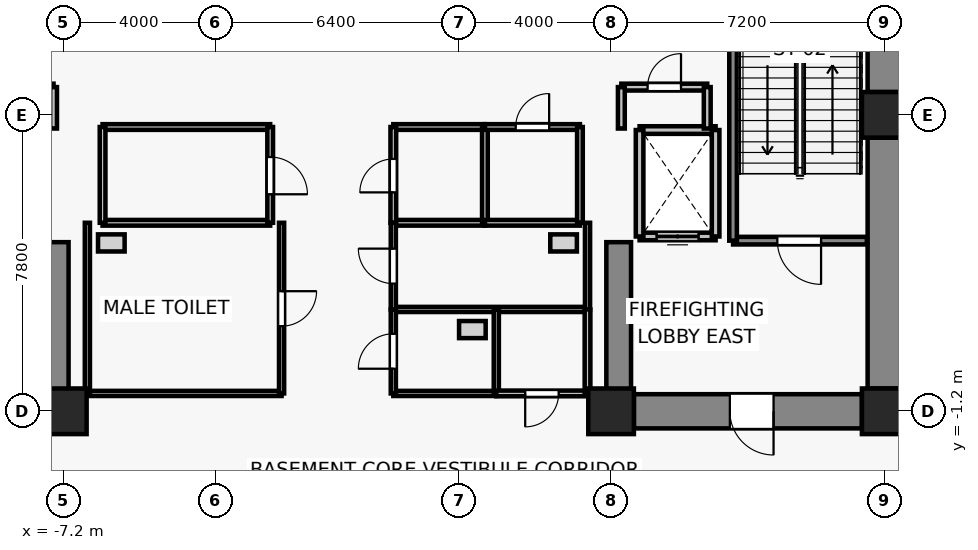
"""IFC4 building model, lengths in metres.
Left out: names, types, materials, properties, quantities, classifications, styles, units other than length and angle.
Written with IfcOpenShell. Run it as: python <this file> out.ifc"""

import sys

from ifc_helpers import new_model, si_unit, direction, frame, frame_2d, origin, origin_2d, place, context, subcontext, project, spatial, rectangle, extrude, source, transform, mapped, element, fill, save


model = new_model("IFC4")
c1 = context("Model", 3, precision=1e-05, world=origin(), true_north=direction((0.0, 1.0)))
c2 = subcontext(c1, "Body", "Model", "MODEL_VIEW")
j1 = project(units=[si_unit("LENGTHUNIT", "METRE"), si_unit("PLANEANGLEUNIT", "RADIAN")], contexts=[c1])
p1 = place(None, origin())
s1 = spatial("IfcSite", under=j1, at=p1, CompositionType="ELEMENT")
p2 = place(p1, origin())
s2 = spatial("IfcBuilding", under=s1, at=p2, CompositionType="ELEMENT")
p3 = place(p2, frame((0.0, 0.0, -4.4)))
s3 = spatial("IfcBuildingStorey", under=s2, at=p3, CompositionType="ELEMENT", Elevation=-4.4)
for number, where, z_axis, x_axis in (
    (1, (-7.2, -1.2, 0.0), (0.0, 0.0, 1.0), (1.0, 0.0, 0.0)),
    (2, (7.2, -1.2, 0.0), (0.0, 0.0, 1.0), (1.0, 0.0, 0.0)),
    (3, (14.4, -1.2, 0.0), (0.0, 0.0, 1.0), (1.0, 0.0, 0.0)),
    (4, (14.4, 6.6, 0.0), (0.0, 0.0, 1.0), (1.0, 0.0, 0.0)),
):
    element("IfcColumn", number, at=place(p3, frame(where, z_axis=z_axis, x_axis=x_axis)), inside=s3, PredefinedType="COLUMN", context=c2, shape_type="SweptSolid", body=[
        extrude(rectangle(XDim=1.2, YDim=1.2, at=origin_2d()), origin(), (0.0, 0.0, 1.0), 4.4),
    ])
p4 = place(p3, frame((14.4, -0.6, 0.0), z_axis=(0.0, 0.0, 1.0), x_axis=(0.0, 1.0, 0.0)))
e5 = element("IfcWall", 5, at=p4, inside=s3, PredefinedType="SHEAR", context=c2, shape_type="SweptSolid", body=[
    extrude(rectangle(XDim=6.6, YDim=0.9, at=frame_2d((3.3, 0.0))), origin(), (0.0, 0.0, 1.0), 4.1),
])
p5 = place(p3, frame((14.4, 7.2, 0.0), z_axis=(0.0, 0.0, 1.0), x_axis=(0.0, 1.0, 0.0)))
e6 = element("IfcWall", 6, at=p5, inside=s3, PredefinedType="SHEAR", context=c2, shape_type="SweptSolid", body=[
    extrude(rectangle(XDim=5.7, YDim=0.9, at=frame_2d((2.85, 0.0))), origin(), (0.0, 0.0, 1.0), 4.1),
])
p6 = place(p3, frame((13.8, -1.2, 0.0), z_axis=(0.0, 0.0, 1.0), x_axis=(-1.0, 0.0, 0.0)))
e7 = element("IfcWall", 7, at=p6, inside=s3, PredefinedType="SHEAR", context=c2, shape_type="SweptSolid", body=[
    extrude(rectangle(XDim=6.0, YDim=0.9, at=frame_2d((3.0, 0.0))), origin(), (0.0, 0.0, 1.0), 4.1),
])
p7 = place(p6, frame((2.325, 0.0, 0.0)))
e8 = element("IfcOpeningElement", 8, at=p7, cuts=e7, PredefinedType="OPENING", context=c2, shape_type="SweptSolid", body=[
    extrude(rectangle(XDim=1.15, YDim=2.15, at=frame_2d((0.575, 1.075))), frame((0.0, 0.46, 0.0), z_axis=(0.0, -1.0, 0.0), x_axis=(1.0, 0.0, 0.0)), (0.0, 0.0, 1.0), 0.92),
])
for number, where, z_axis, x_axis in (
    (9, (-7.4, -0.75, 0.0), (0.0, 0.0, 1.0), (0.0, 1.0, 0.0)),
    (10, (7.4, -0.75, 0.0), (0.0, 0.0, 1.0), (0.0, 1.0, 0.0)),
):
    element("IfcWall", number, at=place(p3, frame(where, z_axis=z_axis, x_axis=x_axis)), inside=s3, PredefinedType="SHEAR", context=c2, shape_type="SweptSolid", body=[
        extrude(rectangle(XDim=4.0, YDim=0.65, at=frame_2d((2.0, 0.0))), origin(), (0.0, 0.0, 1.0), 4.1),
    ])
p8 = place(p3, frame((9.95, 3.4, 0.0), z_axis=(0.0, 0.0, 1.0), x_axis=(-1.0, 0.0, 0.0)))
e11 = element("IfcWall", 11, at=p8, inside=s3, PredefinedType="SOLIDWALL", context=c2, shape_type="SweptSolid", body=[
    extrude(rectangle(XDim=2.0, YDim=0.2, at=frame_2d((1.0, 0.0))), origin(), (0.0, 0.0, 1.0), 4.1),
])
p9 = place(p8, frame((0.45, 0.0, 0.0)))
e12 = element("IfcOpeningElement", 12, at=p9, cuts=e11, PredefinedType="OPENING", context=c2, shape_type="SweptSolid", body=[
    extrude(rectangle(XDim=1.1, YDim=2.2, at=frame_2d((0.55, 1.1))), frame((0.0, 0.11, 0.0), z_axis=(0.0, -1.0, 0.0), x_axis=(1.0, 0.0, 0.0)), (0.0, 0.0, 1.0), 0.22),
])
p10 = place(p3, frame((7.95, 6.2, 0.0), z_axis=(0.0, 0.0, 1.0), x_axis=(1.0, 0.0, 0.0)))
e13 = element("IfcWall", 13, at=p10, inside=s3, PredefinedType="SOLIDWALL", context=c2, shape_type="SweptSolid", body=[
    extrude(rectangle(XDim=2.0, YDim=0.2, at=frame_2d((1.0, 0.0))), origin(), (0.0, 0.0, 1.0), 4.1),
])
for number, where, z_axis, x_axis in (
    (14, (7.95, 3.4, 0.0), (0.0, 0.0, 1.0), (0.0, 1.0, 0.0)),
    (15, (9.95, 6.2, 0.0), (0.0, 0.0, 1.0), (0.0, -1.0, 0.0)),
):
    element("IfcWall", number, at=place(p3, frame(where, z_axis=z_axis, x_axis=x_axis)), inside=s3, PredefinedType="SOLIDWALL", context=c2, shape_type="SweptSolid", body=[
        extrude(rectangle(XDim=2.8, YDim=0.2, at=frame_2d((1.4, 0.0))), origin(), (0.0, 0.0, 1.0), 4.1),
    ])
p11 = place(p3, frame((13.93, 3.29, 0.0), z_axis=(0.0, 0.0, 1.0), x_axis=(-1.0, 0.0, 0.0)))
e16 = element("IfcWall", 16, at=p11, inside=s3, PredefinedType="SOLIDWALL", context=c2, shape_type="SweptSolid", body=[
    extrude(rectangle(XDim=3.52, YDim=0.2, at=frame_2d((1.76, 0.0))), origin(), (0.0, 0.0, 1.0), 4.1),
])
p12 = place(p11, frame((1.205, 0.0, 0.0)))
e17 = element("IfcOpeningElement", 17, at=p12, cuts=e16, PredefinedType="OPENING", context=c2, shape_type="SweptSolid", body=[
    extrude(rectangle(XDim=1.15, YDim=2.15, at=frame_2d((0.575, 1.075))), frame((0.0, 0.11, 0.0), z_axis=(0.0, -1.0, 0.0), x_axis=(1.0, 0.0, 0.0)), (0.0, 0.0, 1.0), 0.22),
])
p13 = place(p3, frame((10.41, 3.29, 0.0), z_axis=(0.0, 0.0, 1.0), x_axis=(0.0, 1.0, 0.0)))
e18 = element("IfcWall", 18, at=p13, inside=s3, PredefinedType="SOLIDWALL", context=c2, shape_type="SweptSolid", body=[
    extrude(rectangle(XDim=8.84, YDim=0.2, at=frame_2d((4.42, 0.0))), origin(), (0.0, 0.0, 1.0), 4.1),
])
p14 = place(p3, frame((-9.73, 7.33, 0.0), z_axis=(0.0, 0.0, 1.0), x_axis=(1.0, 0.0, 0.0)))
e19 = element("IfcWall", 19, at=p14, inside=s3, PredefinedType="PARTITIONING", context=c2, shape_type="SweptSolid", body=[
    extrude(rectangle(XDim=2.26, YDim=0.18, at=frame_2d((1.13, 0.0))), origin(), (0.0, 0.0, 1.0), 3.19),
])
p15 = place(p14, frame((0.69, 0.0, 0.0)))
e20 = element("IfcOpeningElement", 20, at=p15, cuts=e19, PredefinedType="OPENING", context=c2, shape_type="SweptSolid", body=[
    extrude(rectangle(XDim=0.88, YDim=2.1, at=frame_2d((0.44, 1.05))), frame((0.0, 0.1, 0.0), z_axis=(0.0, -1.0, 0.0), x_axis=(1.0, 0.0, 0.0)), (0.0, 0.0, 1.0), 0.2),
])
p16 = place(p3, frame((-7.47, 7.33, 0.0), z_axis=(0.0, 0.0, 1.0), x_axis=(0.0, -1.0, 0.0)))
e21 = element("IfcWall", 21, at=p16, inside=s3, PredefinedType="PARTITIONING", context=c2, shape_type="SweptSolid", body=[
    extrude(rectangle(XDim=1.09, YDim=0.18, at=frame_2d((0.545, 0.0))), origin(), (0.0, 0.0, 1.0), 3.19),
])
p17 = place(p3, frame((7.47, 7.33, 0.0), z_axis=(0.0, 0.0, 1.0), x_axis=(1.0, 0.0, 0.0)))
e22 = element("IfcWall", 22, at=p17, inside=s3, PredefinedType="PARTITIONING", context=c2, shape_type="SweptSolid", body=[
    extrude(rectangle(XDim=2.26, YDim=0.18, at=frame_2d((1.13, 0.0))), origin(), (0.0, 0.0, 1.0), 3.19),
])
p18 = place(p17, frame((0.69, 0.0, 0.0)))
e23 = element("IfcOpeningElement", 23, at=p18, cuts=e22, PredefinedType="OPENING", context=c2, shape_type="SweptSolid", body=[
    extrude(rectangle(XDim=0.88, YDim=2.1, at=frame_2d((0.44, 1.05))), frame((0.0, 0.1, 0.0), z_axis=(0.0, -1.0, 0.0), x_axis=(1.0, 0.0, 0.0)), (0.0, 0.0, 1.0), 0.2),
])
p19 = place(p3, frame((7.47, 6.24, 0.0), z_axis=(0.0, 0.0, 1.0), x_axis=(0.0, 1.0, 0.0)))
e24 = element("IfcWall", 24, at=p19, inside=s3, PredefinedType="PARTITIONING", context=c2, shape_type="SweptSolid", body=[
    extrude(rectangle(XDim=1.09, YDim=0.18, at=frame_2d((0.545, 0.0))), origin(), (0.0, 0.0, 1.0), 3.19),
])
p20 = place(p3, frame((9.73, 7.33, 0.0), z_axis=(0.0, 0.0, 1.0), x_axis=(0.0, -1.0, 0.0)))
e25 = element("IfcWall", 25, at=p20, inside=s3, PredefinedType="PARTITIONING", context=c2, shape_type="SweptSolid", body=[
    extrude(rectangle(XDim=1.09, YDim=0.18, at=frame_2d((0.545, 0.0))), origin(), (0.0, 0.0, 1.0), 4.1),
])
for number, where, z_axis, x_axis in (
    (26, (-1.77, 3.76, 0.0), (0.0, 0.0, 1.0), (-1.0, 0.0, 0.0)),
    (27, (-6.18, 6.28, 0.0), (0.0, 0.0, 1.0), (1.0, 0.0, 0.0)),
):
    element("IfcWall", number, at=place(p3, frame(where, z_axis=z_axis, x_axis=x_axis)), inside=s3, PredefinedType="PARTITIONING", context=c2, shape_type="SweptSolid", body=[
        extrude(rectangle(XDim=4.41, YDim=0.15, at=frame_2d((2.205, 0.0))), origin(), (0.0, 0.0, 1.0), 4.1),
    ])
p21 = place(p3, frame((-6.18, 3.76, 0.0), z_axis=(0.0, 0.0, 1.0), x_axis=(0.0, 1.0, 0.0)))
e28 = element("IfcWall", 28, at=p21, inside=s3, PredefinedType="PARTITIONING", context=c2, shape_type="SweptSolid", body=[
    extrude(rectangle(XDim=2.52, YDim=0.15, at=frame_2d((1.26, 0.0))), origin(), (0.0, 0.0, 1.0), 4.1),
])
p22 = place(p3, frame((-1.77, 6.28, 0.0), z_axis=(0.0, 0.0, 1.0), x_axis=(0.0, -1.0, 0.0)))
e29 = element("IfcWall", 29, at=p22, inside=s3, PredefinedType="PARTITIONING", context=c2, shape_type="SweptSolid", body=[
    extrude(rectangle(XDim=2.52, YDim=0.15, at=frame_2d((1.26, 0.0))), origin(), (0.0, 0.0, 1.0), 4.1),
])
p23 = place(p22, frame((0.79, 0.0, 0.0)))
e30 = element("IfcOpeningElement", 30, at=p23, cuts=e29, PredefinedType="OPENING", context=c2, shape_type="SweptSolid", body=[
    extrude(rectangle(XDim=0.98, YDim=2.15, at=frame_2d((0.49, 1.075))), frame((0.0, 0.085, 0.0), z_axis=(0.0, -1.0, 0.0), x_axis=(1.0, 0.0, 0.0)), (0.0, 0.0, 1.0), 0.17),
])
for number, where, z_axis, x_axis in (
    (31, (3.88, 3.76, 0.0), (0.0, 0.0, 1.0), (-1.0, 0.0, 0.0)),
    (32, (1.47, 6.28, 0.0), (0.0, 0.0, 1.0), (1.0, 0.0, 0.0)),
):
    element("IfcWall", number, at=place(p3, frame(where, z_axis=z_axis, x_axis=x_axis)), inside=s3, PredefinedType="PARTITIONING", context=c2, shape_type="SweptSolid", body=[
        extrude(rectangle(XDim=2.41, YDim=0.15, at=frame_2d((1.205, 0.0))), origin(), (0.0, 0.0, 1.0), 4.1),
    ])
p24 = place(p3, frame((1.47, 3.76, 0.0), z_axis=(0.0, 0.0, 1.0), x_axis=(0.0, 1.0, 0.0)))
e33 = element("IfcWall", 33, at=p24, inside=s3, PredefinedType="PARTITIONING", context=c2, shape_type="SweptSolid", body=[
    extrude(rectangle(XDim=2.52, YDim=0.15, at=frame_2d((1.26, 0.0))), origin(), (0.0, 0.0, 1.0), 4.1),
])
p25 = place(p24, frame((0.8, 0.0, 0.0)))
e34 = element("IfcOpeningElement", 34, at=p25, cuts=e33, PredefinedType="OPENING", context=c2, shape_type="SweptSolid", body=[
    extrude(rectangle(XDim=0.88, YDim=2.1, at=frame_2d((0.44, 1.05))), frame((0.0, 0.085, 0.0), z_axis=(0.0, -1.0, 0.0), x_axis=(1.0, 0.0, 0.0)), (0.0, 0.0, 1.0), 0.17),
])
p26 = place(p3, frame((3.88, 6.28, 0.0), z_axis=(0.0, 0.0, 1.0), x_axis=(0.0, -1.0, 0.0)))
e35 = element("IfcWall", 35, at=p26, inside=s3, PredefinedType="PARTITIONING", context=c2, shape_type="SweptSolid", body=[
    extrude(rectangle(XDim=2.52, YDim=0.15, at=frame_2d((1.26, 0.0))), origin(), (0.0, 0.0, 1.0), 4.1),
])
p27 = place(p3, frame((6.38, 3.76, 0.0), z_axis=(0.0, 0.0, 1.0), x_axis=(-1.0, 0.0, 0.0)))
e36 = element("IfcWall", 36, at=p27, inside=s3, PredefinedType="PARTITIONING", context=c2, shape_type="SweptSolid", body=[
    extrude(rectangle(XDim=2.5, YDim=0.15, at=frame_2d((1.25, 0.0))), origin(), (0.0, 0.0, 1.0), 4.1),
])
p28 = place(p3, frame((3.88, 6.28, 0.0), z_axis=(0.0, 0.0, 1.0), x_axis=(1.0, 0.0, 0.0)))
e37 = element("IfcWall", 37, at=p28, inside=s3, PredefinedType="PARTITIONING", context=c2, shape_type="SweptSolid", body=[
    extrude(rectangle(XDim=2.5, YDim=0.15, at=frame_2d((1.25, 0.0))), origin(), (0.0, 0.0, 1.0), 4.1),
])
p29 = place(p28, frame((0.81, 0.0, 0.0)))
e38 = element("IfcOpeningElement", 38, at=p29, cuts=e37, PredefinedType="OPENING", context=c2, shape_type="SweptSolid", body=[
    extrude(rectangle(XDim=0.88, YDim=2.15, at=frame_2d((0.44, 1.075))), frame((0.0, 0.085, 0.0), z_axis=(0.0, -1.0, 0.0), x_axis=(1.0, 0.0, 0.0)), (0.0, 0.0, 1.0), 0.17),
])
p30 = place(p3, frame((6.38, 6.28, 0.0), z_axis=(0.0, 0.0, 1.0), x_axis=(0.0, -1.0, 0.0)))
e39 = element("IfcWall", 39, at=p30, inside=s3, PredefinedType="PARTITIONING", context=c2, shape_type="SweptSolid", body=[
    extrude(rectangle(XDim=2.52, YDim=0.15, at=frame_2d((1.26, 0.0))), origin(), (0.0, 0.0, 1.0), 4.1),
])
p31 = place(p3, frame((-1.47, -0.73, 0.0), z_axis=(0.0, 0.0, 1.0), x_axis=(-1.0, 0.0, 0.0)))
e40 = element("IfcWall", 40, at=p31, inside=s3, PredefinedType="PARTITIONING", context=c2, shape_type="SweptSolid", body=[
    extrude(rectangle(XDim=5.11, YDim=0.135, at=frame_2d((2.555, 0.0))), origin(), (0.0, 0.0, 1.0), 4.1),
])
p32 = place(p3, frame((-6.58, -0.73, 0.0), z_axis=(0.0, 0.0, 1.0), x_axis=(0.0, 1.0, 0.0)))
e41 = element("IfcWall", 41, at=p32, inside=s3, PredefinedType="PARTITIONING", context=c2, shape_type="SweptSolid", body=[
    extrude(rectangle(XDim=4.49, YDim=0.135, at=frame_2d((2.245, 0.0))), origin(), (0.0, 0.0, 1.0), 3.473),
])
p33 = place(p3, frame((-1.47, 3.76, 0.0), z_axis=(0.0, 0.0, 1.0), x_axis=(0.0, -1.0, 0.0)))
e42 = element("IfcWall", 42, at=p33, inside=s3, PredefinedType="PARTITIONING", context=c2, shape_type="SweptSolid", body=[
    extrude(rectangle(XDim=4.49, YDim=0.135, at=frame_2d((2.245, 0.0))), origin(), (0.0, 0.0, 1.0), 3.473),
])
p34 = place(p33, frame((1.8, 0.0, 0.0)))
e43 = element("IfcOpeningElement", 43, at=p34, cuts=e42, PredefinedType="OPENING", context=c2, shape_type="SweptSolid", body=[
    extrude(rectangle(XDim=0.92, YDim=2.1, at=frame_2d((0.46, 1.05))), frame((0.0, 0.077, 0.0), z_axis=(0.0, -1.0, 0.0), x_axis=(1.0, 0.0, 0.0)), (0.0, 0.0, 1.0), 0.155),
])
p35 = place(p3, frame((6.58, 1.48, 0.0), z_axis=(0.0, 0.0, 1.0), x_axis=(-1.0, 0.0, 0.0)))
e44 = element("IfcWall", 44, at=p35, inside=s3, PredefinedType="PARTITIONING", context=c2, shape_type="SweptSolid", body=[
    extrude(rectangle(XDim=5.11, YDim=0.135, at=frame_2d((2.555, 0.0))), origin(), (0.0, 0.0, 1.0), 4.1),
])
p36 = place(p3, frame((1.47, 1.48, 0.0), z_axis=(0.0, 0.0, 1.0), x_axis=(0.0, 1.0, 0.0)))
e45 = element("IfcWall", 45, at=p36, inside=s3, PredefinedType="PARTITIONING", context=c2, shape_type="SweptSolid", body=[
    extrude(rectangle(XDim=2.28, YDim=0.135, at=frame_2d((1.14, 0.0))), origin(), (0.0, 0.0, 1.0), 3.473),
])
p37 = place(p36, frame((0.68, 0.0, 0.0)))
e46 = element("IfcOpeningElement", 46, at=p37, cuts=e45, PredefinedType="OPENING", context=c2, shape_type="SweptSolid", body=[
    extrude(rectangle(XDim=0.92, YDim=2.1, at=frame_2d((0.46, 1.05))), frame((0.0, 0.077, 0.0), z_axis=(0.0, -1.0, 0.0), x_axis=(1.0, 0.0, 0.0)), (0.0, 0.0, 1.0), 0.155),
])
p38 = place(p3, frame((6.58, 3.76, 0.0), z_axis=(0.0, 0.0, 1.0), x_axis=(0.0, -1.0, 0.0)))
e47 = element("IfcWall", 47, at=p38, inside=s3, PredefinedType="PARTITIONING", context=c2, shape_type="SweptSolid", body=[
    extrude(rectangle(XDim=2.28, YDim=0.135, at=frame_2d((1.14, 0.0))), origin(), (0.0, 0.0, 1.0), 3.473),
])
p39 = place(p3, frame((4.18, -0.73, 0.0), z_axis=(0.0, 0.0, 1.0), x_axis=(-1.0, 0.0, 0.0)))
e48 = element("IfcWall", 48, at=p39, inside=s3, PredefinedType="PARTITIONING", context=c2, shape_type="SweptSolid", body=[
    extrude(rectangle(XDim=2.71, YDim=0.135, at=frame_2d((1.355, 0.0))), origin(), (0.0, 0.0, 1.0), 4.1),
])
p40 = place(p3, frame((1.47, -0.73, 0.0), z_axis=(0.0, 0.0, 1.0), x_axis=(0.0, 1.0, 0.0)))
e49 = element("IfcWall", 49, at=p40, inside=s3, PredefinedType="PARTITIONING", context=c2, shape_type="SweptSolid", body=[
    extrude(rectangle(XDim=2.21, YDim=0.135, at=frame_2d((1.105, 0.0))), origin(), (0.0, 0.0, 1.0), 4.1),
])
p41 = place(p40, frame((0.65, 0.0, 0.0)))
e50 = element("IfcOpeningElement", 50, at=p41, cuts=e49, PredefinedType="OPENING", context=c2, shape_type="SweptSolid", body=[
    extrude(rectangle(XDim=0.92, YDim=2.1, at=frame_2d((0.46, 1.05))), frame((0.0, 0.077, 0.0), z_axis=(0.0, -1.0, 0.0), x_axis=(1.0, 0.0, 0.0)), (0.0, 0.0, 1.0), 0.155),
])
p42 = place(p3, frame((4.18, 1.48, 0.0), z_axis=(0.0, 0.0, 1.0), x_axis=(0.0, -1.0, 0.0)))
e51 = element("IfcWall", 51, at=p42, inside=s3, PredefinedType="PARTITIONING", context=c2, shape_type="SweptSolid", body=[
    extrude(rectangle(XDim=2.21, YDim=0.135, at=frame_2d((1.105, 0.0))), origin(), (0.0, 0.0, 1.0), 4.1),
])
p43 = place(p3, frame((6.58, -0.73, 0.0), z_axis=(0.0, 0.0, 1.0), x_axis=(-1.0, 0.0, 0.0)))
e52 = element("IfcWall", 52, at=p43, inside=s3, PredefinedType="PARTITIONING", context=c2, shape_type="SweptSolid", body=[
    extrude(rectangle(XDim=2.4, YDim=0.15, at=frame_2d((1.2, 0.0))), origin(), (0.0, 0.0, 1.0), 4.1),
])
p44 = place(p43, frame((0.76, 0.0, 0.0)))
e53 = element("IfcOpeningElement", 53, at=p44, cuts=e52, PredefinedType="OPENING", context=c2, shape_type="SweptSolid", body=[
    extrude(rectangle(XDim=0.88, YDim=2.1, at=frame_2d((0.44, 1.05))), frame((0.0, 0.085, 0.0), z_axis=(0.0, -1.0, 0.0), x_axis=(1.0, 0.0, 0.0)), (0.0, 0.0, 1.0), 0.17),
])
p45 = place(p3, frame((6.58, 1.48, 0.0), z_axis=(0.0, 0.0, 1.0), x_axis=(0.0, -1.0, 0.0)))
e54 = element("IfcWall", 54, at=p45, inside=s3, PredefinedType="PARTITIONING", context=c2, shape_type="SweptSolid", body=[
    extrude(rectangle(XDim=2.21, YDim=0.15, at=frame_2d((1.105, 0.0))), origin(), (0.0, 0.0, 1.0), 4.1),
])
m1 = source(origin(), c2, "Body", "SweptSolid", [
    extrude(rectangle(XDim=1.1, YDim=2.2, at=frame_2d((0.55, 1.1))), frame((0.0, 0.025, 0.0), z_axis=(0.0, -1.0, 0.0), x_axis=(1.0, 0.0, 0.0)), (0.0, 0.0, 1.0), 0.05),
])
p46 = place(p9, origin())
e55 = element("IfcDoor", 55, at=p46, inside=s3, OperationType="DOUBLE_DOOR_SLIDING", PredefinedType="DOOR", context=c2, shape_type="MappedRepresentation", body=[
    mapped(m1, transform((0.0, 0.0, 0.0), x_axis=(1.0, 0.0, 0.0), y_axis=(0.0, 1.0, 0.0), z_axis=(0.0, 0.0, 1.0), scale=1.0)),
])
fill(e12, e55)
m2 = source(origin(), c2, "Body", "SweptSolid", [
    extrude(rectangle(XDim=1.15, YDim=2.15, at=frame_2d((0.575, 1.075))), frame((0.0, 0.025, 0.0), z_axis=(0.0, -1.0, 0.0), x_axis=(1.0, 0.0, 0.0)), (0.0, 0.0, 1.0), 0.05),
])
p47 = place(p12, origin())
e56 = element("IfcDoor", 56, at=p47, inside=s3, OperationType="SINGLE_SWING_LEFT", PredefinedType="DOOR", context=c2, shape_type="MappedRepresentation", body=[
    mapped(m2, transform((0.0, 0.0, 0.0), x_axis=(1.0, 0.0, 0.0), y_axis=(0.0, 1.0, 0.0), z_axis=(0.0, 0.0, 1.0), scale=1.0)),
])
fill(e17, e56)
p48 = place(p7, origin())
e57 = element("IfcDoor", 57, at=p48, inside=s3, OperationType="SINGLE_SWING_LEFT", PredefinedType="DOOR", context=c2, shape_type="MappedRepresentation", body=[
    mapped(m2, transform((0.0, 0.0, 0.0), x_axis=(1.0, 0.0, 0.0), y_axis=(0.0, 1.0, 0.0), z_axis=(0.0, 0.0, 1.0), scale=1.0)),
])
fill(e8, e57)
m3 = source(origin(), c2, "Body", "SweptSolid", [
    extrude(rectangle(XDim=0.98, YDim=2.15, at=frame_2d((0.49, 1.075))), frame((0.0, 0.025, 0.0), z_axis=(0.0, -1.0, 0.0), x_axis=(1.0, 0.0, 0.0)), (0.0, 0.0, 1.0), 0.05),
])
p49 = place(p23, origin())
e58 = element("IfcDoor", 58, at=p49, inside=s3, OperationType="SINGLE_SWING_RIGHT", PredefinedType="DOOR", context=c2, shape_type="MappedRepresentation", body=[
    mapped(m3, transform((0.0, 0.0, 0.0), x_axis=(1.0, 0.0, 0.0), y_axis=(0.0, 1.0, 0.0), z_axis=(0.0, 0.0, 1.0), scale=1.0)),
])
fill(e30, e58)
m4 = source(origin(), c2, "Body", "SweptSolid", [
    extrude(rectangle(XDim=0.88, YDim=2.1, at=frame_2d((0.44, 1.05))), frame((0.0, 0.025, 0.0), z_axis=(0.0, -1.0, 0.0), x_axis=(1.0, 0.0, 0.0)), (0.0, 0.0, 1.0), 0.05),
])
p50 = place(p25, origin())
e59 = element("IfcDoor", 59, at=p50, inside=s3, OperationType="SINGLE_SWING_LEFT", PredefinedType="DOOR", context=c2, shape_type="MappedRepresentation", body=[
    mapped(m4, transform((0.0, 0.0, 0.0), x_axis=(1.0, 0.0, 0.0), y_axis=(0.0, 1.0, 0.0), z_axis=(0.0, 0.0, 1.0), scale=1.0)),
])
fill(e34, e59)
m5 = source(origin(), c2, "Body", "SweptSolid", [
    extrude(rectangle(XDim=0.88, YDim=2.15, at=frame_2d((0.44, 1.075))), frame((0.0, 0.025, 0.0), z_axis=(0.0, -1.0, 0.0), x_axis=(1.0, 0.0, 0.0)), (0.0, 0.0, 1.0), 0.05),
])
p51 = place(p29, origin())
e60 = element("IfcDoor", 60, at=p51, inside=s3, OperationType="SINGLE_SWING_RIGHT", PredefinedType="DOOR", context=c2, shape_type="MappedRepresentation", body=[
    mapped(m5, transform((0.0, 0.0, 0.0), x_axis=(1.0, 0.0, 0.0), y_axis=(0.0, 1.0, 0.0), z_axis=(0.0, 0.0, 1.0), scale=1.0)),
])
fill(e38, e60)
m6 = source(origin(), c2, "Body", "SweptSolid", [
    extrude(rectangle(XDim=0.92, YDim=2.1, at=frame_2d((0.46, 1.05))), frame((0.0, 0.025, 0.0), z_axis=(0.0, -1.0, 0.0), x_axis=(1.0, 0.0, 0.0)), (0.0, 0.0, 1.0), 0.05),
])
p52 = place(p34, origin())
e61 = element("IfcDoor", 61, at=p52, inside=s3, OperationType="SINGLE_SWING_LEFT", PredefinedType="DOOR", context=c2, shape_type="MappedRepresentation", body=[
    mapped(m6, transform((0.0, 0.0, 0.0), x_axis=(1.0, 0.0, 0.0), y_axis=(0.0, 1.0, 0.0), z_axis=(0.0, 0.0, 1.0), scale=1.0)),
])
fill(e43, e61)
p53 = place(p37, origin())
e62 = element("IfcDoor", 62, at=p53, inside=s3, OperationType="SINGLE_SWING_RIGHT", PredefinedType="DOOR", context=c2, shape_type="MappedRepresentation", body=[
    mapped(m6, transform((0.0, 0.0, 0.0), x_axis=(1.0, 0.0, 0.0), y_axis=(0.0, 1.0, 0.0), z_axis=(0.0, 0.0, 1.0), scale=1.0)),
])
fill(e46, e62)
p54 = place(p41, origin())
e63 = element("IfcDoor", 63, at=p54, inside=s3, OperationType="SINGLE_SWING_LEFT", PredefinedType="DOOR", context=c2, shape_type="MappedRepresentation", body=[
    mapped(m6, transform((0.0, 0.0, 0.0), x_axis=(1.0, 0.0, 0.0), y_axis=(0.0, 1.0, 0.0), z_axis=(0.0, 0.0, 1.0), scale=1.0)),
])
fill(e50, e63)
p55 = place(p44, origin())
e64 = element("IfcDoor", 64, at=p55, inside=s3, OperationType="SINGLE_SWING_RIGHT", PredefinedType="DOOR", context=c2, shape_type="MappedRepresentation", body=[
    mapped(m4, transform((0.0, 0.0, 0.0), x_axis=(1.0, 0.0, 0.0), y_axis=(0.0, 1.0, 0.0), z_axis=(0.0, 0.0, 1.0), scale=1.0)),
])
fill(e53, e64)
p56 = place(p18, origin())
e65 = element("IfcDoor", 65, at=p56, inside=s3, OperationType="SINGLE_SWING_RIGHT", PredefinedType="DOOR", context=c2, shape_type="MappedRepresentation", body=[
    mapped(m4, transform((0.0, 0.0, 0.0), x_axis=(1.0, 0.0, 0.0), y_axis=(0.0, 1.0, 0.0), z_axis=(0.0, 0.0, 1.0), scale=1.0)),
])
fill(e23, e65)
save(model, sys.argv[1])
